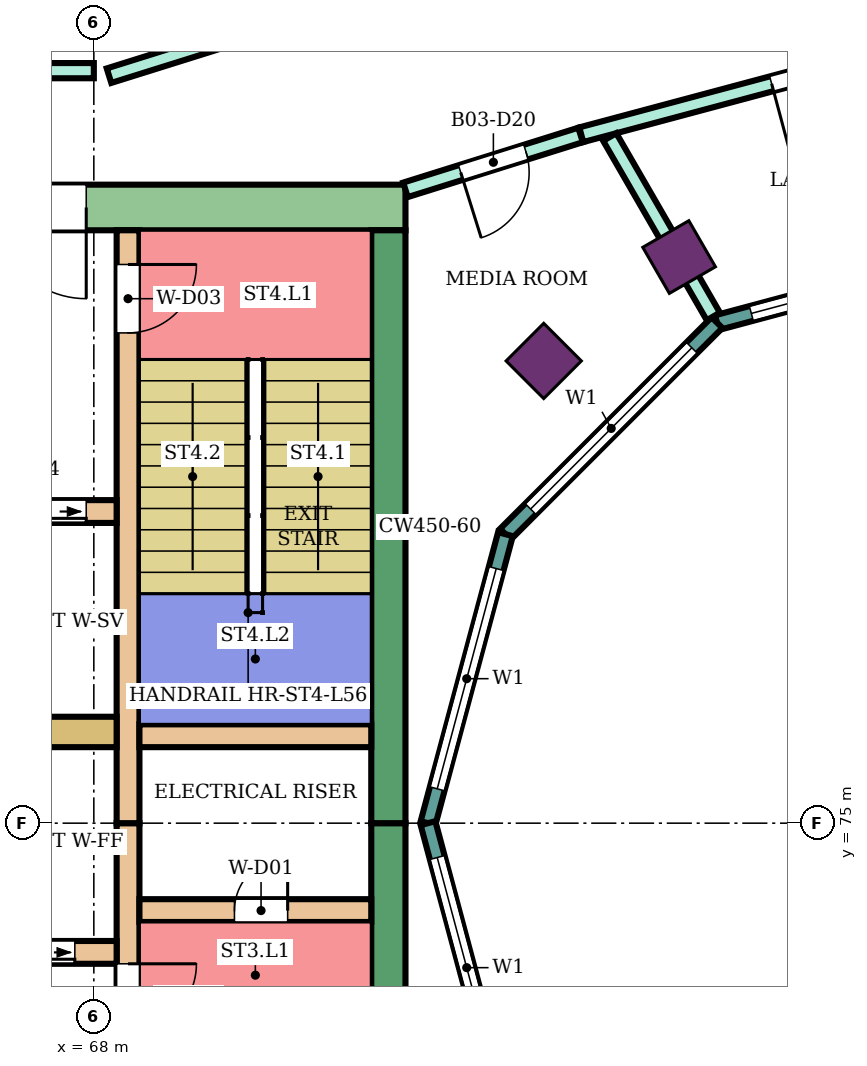
"""IFC4 building model, lengths in metres.
Left out: names, types, materials, properties, quantities, classifications, styles, units other than length and angle.
Written with IfcOpenShell. Run it as: python <this file> out.ifc"""

import sys

from ifc_helpers import new_model, si_unit, direction, frame, frame_2d, origin, origin_2d, place, context, subcontext, project, spatial, rectangle, extrude, element, fill, save


model = new_model("IFC4")
c1 = context("Model", 3, precision=1e-05, world=origin(), true_north=direction((0.0, 1.0)))
c2 = subcontext(c1, "Body", "Model", "MODEL_VIEW")
j1 = project(units=[si_unit("LENGTHUNIT", "METRE"), si_unit("PLANEANGLEUNIT", "RADIAN")], contexts=[c1])
p1 = place(None, origin())
s1 = spatial("IfcSite", under=j1, at=p1, CompositionType="ELEMENT")
p2 = place(p1, origin())
s2 = spatial("IfcBuilding", under=s1, at=p2, CompositionType="ELEMENT")
p3 = place(p2, frame((0.0, 0.0, 245.7)))
s3 = spatial("IfcBuildingStorey", under=s2, at=p3, CompositionType="ELEMENT", Elevation=245.7)
for number, where, z_axis, x_axis in (
    (1, (75.7, 82.448, 0.0), (0.0, 0.0, 1.0), (-0.5, 0.866, 0.0)),
    (2, (73.919, 81.081, 0.0), (0.0, 0.0, 1.0), (-0.707, 0.707, 0.0)),
):
    element("IfcColumn", number, at=place(p3, frame(where, z_axis=z_axis, x_axis=x_axis)), inside=s3, PredefinedType="COLUMN", context=c2, shape_type="SweptSolid", body=[
        extrude(rectangle(XDim=0.7, YDim=0.7, at=origin_2d()), origin(), (0.0, 0.0, 1.0), 4.2),
    ])
p4 = place(p3, frame((72.1, 83.1, 0.0), z_axis=(0.0, 0.0, 1.0), x_axis=(-1.0, 0.0, 0.0)))
e3 = element("IfcWall", 3, at=p4, inside=s3, PredefinedType="SHEAR", context=c2, shape_type="SweptSolid", body=[
    extrude(rectangle(XDim=14.9, YDim=0.6, at=frame_2d((7.45, 0.0))), origin(), (0.0, 0.0, 1.0), 3.88),
])
p5 = place(p4, frame((4.2, 0.0, 0.0)))
e4 = element("IfcOpeningElement", 4, at=p5, cuts=e3, PredefinedType="OPENING", context=c2, shape_type="SweptSolid", body=[
    extrude(rectangle(XDim=2.4, YDim=2.4, at=frame_2d((1.2, 1.2))), frame((0.0, 0.31, 0.0), z_axis=(0.0, -1.0, 0.0), x_axis=(1.0, 0.0, 0.0)), (0.0, 0.0, 1.0), 0.62),
])
for number, where, z_axis, x_axis in (
    (5, (71.875, 75.0, 0.0), (0.0, 0.0, 1.0), (0.0, -1.0, 0.0)),
    (6, (71.875, 82.8, 0.0), (0.0, 0.0, 1.0), (0.0, -1.0, 0.0)),
):
    element("IfcWall", number, at=place(p3, frame(where, z_axis=z_axis, x_axis=x_axis)), inside=s3, PredefinedType="SHEAR", context=c2, shape_type="SweptSolid", body=[
        extrude(rectangle(XDim=7.8, YDim=0.45, at=frame_2d((3.9, 0.0))), origin(), (0.0, 0.0, 1.0), 3.88),
    ])
p6 = place(p3, frame((68.45, 75.0, 0.0), z_axis=(0.0, 0.0, 1.0), x_axis=(0.0, -1.0, 0.0)))
e7 = element("IfcWall", 7, at=p6, inside=s3, PredefinedType="SHEAR", context=c2, shape_type="SweptSolid", body=[
    extrude(rectangle(XDim=7.8, YDim=0.3, at=frame_2d((3.9, 0.0))), origin(), (0.0, 0.0, 1.0), 3.88),
])
p7 = place(p6, frame((1.85, 0.0, 0.0)))
e8 = element("IfcOpeningElement", 8, at=p7, cuts=e7, PredefinedType="OPENING", context=c2, shape_type="SweptSolid", body=[
    extrude(rectangle(XDim=0.9, YDim=2.1, at=frame_2d((0.45, 1.05))), frame((0.0, 0.16, 0.0), z_axis=(0.0, -1.0, 0.0), x_axis=(1.0, 0.0, 0.0)), (0.0, 0.0, 1.0), 0.32),
])
p8 = place(p3, frame((68.45, 82.8, 0.0), z_axis=(0.0, 0.0, 1.0), x_axis=(0.0, -1.0, 0.0)))
e9 = element("IfcWall", 9, at=p8, inside=s3, PredefinedType="SHEAR", context=c2, shape_type="SweptSolid", body=[
    extrude(rectangle(XDim=7.8, YDim=0.3, at=frame_2d((3.9, 0.0))), origin(), (0.0, 0.0, 1.0), 3.88),
])
p9 = place(p8, frame((0.45, 0.0, 0.0)))
e10 = element("IfcOpeningElement", 10, at=p9, cuts=e9, PredefinedType="OPENING", context=c2, shape_type="SweptSolid", body=[
    extrude(rectangle(XDim=0.9, YDim=2.1, at=frame_2d((0.45, 1.05))), frame((0.0, 0.16, 0.0), z_axis=(0.0, -1.0, 0.0), x_axis=(1.0, 0.0, 0.0)), (0.0, 0.0, 1.0), 0.32),
])
p10 = place(p3, frame((71.65, 73.85, 0.0), z_axis=(0.0, 0.0, 1.0), x_axis=(-1.0, 0.0, 0.0)))
e11 = element("IfcWall", 11, at=p10, inside=s3, PredefinedType="SHEAR", context=c2, shape_type="SweptSolid", body=[
    extrude(rectangle(XDim=3.05, YDim=0.3, at=frame_2d((1.525, 0.0))), origin(), (0.0, 0.0, 1.0), 3.88),
])
p11 = place(p10, frame((1.1, 0.0, 0.0)))
e12 = element("IfcOpeningElement", 12, at=p11, cuts=e11, PredefinedType="OPENING", context=c2, shape_type="SweptSolid", body=[
    extrude(rectangle(XDim=0.7, YDim=2.0, at=frame_2d((0.35, 1.0))), frame((0.0, 0.16, 0.0), z_axis=(0.0, -1.0, 0.0), x_axis=(1.0, 0.0, 0.0)), (0.0, 0.0, 1.0), 0.32),
])
p12 = place(p3, frame((71.65, 76.15, 0.0), z_axis=(0.0, 0.0, 1.0), x_axis=(-1.0, 0.0, 0.0)))
e13 = element("IfcWall", 13, at=p12, inside=s3, PredefinedType="SHEAR", context=c2, shape_type="SweptSolid", body=[
    extrude(rectangle(XDim=3.05, YDim=0.3, at=frame_2d((1.525, 0.0))), origin(), (0.0, 0.0, 1.0), 3.88),
])
p13 = place(p3, frame((68.3, 73.3, 0.0), z_axis=(0.0, 0.0, 1.0), x_axis=(-1.0, 0.0, 0.0)))
e14 = element("IfcWall", 14, at=p13, inside=s3, PredefinedType="SHEAR", context=c2, shape_type="SweptSolid", body=[
    extrude(rectangle(XDim=11.1, YDim=0.3, at=frame_2d((5.55, 0.0))), origin(), (0.0, 0.0, 1.0), 3.88),
])
p14 = place(p13, frame((0.55, 0.0, 0.0)))
e15 = element("IfcOpeningElement", 15, at=p14, cuts=e14, PredefinedType="OPENING", context=c2, shape_type="SweptSolid", body=[
    extrude(rectangle(XDim=1.1, YDim=2.1, at=frame_2d((0.55, 1.05))), frame((0.0, 0.16, 0.0), z_axis=(0.0, -1.0, 0.0), x_axis=(1.0, 0.0, 0.0)), (0.0, 0.0, 1.0), 0.32),
])
p15 = place(p13, frame((3.0, 0.0, 0.0)))
e16 = element("IfcOpeningElement", 16, at=p15, cuts=e14, PredefinedType="OPENING", context=c2, shape_type="SweptSolid", body=[
    extrude(rectangle(XDim=1.2, YDim=2.1, at=frame_2d((0.6, 1.05))), frame((0.0, 0.16, 0.0), z_axis=(0.0, -1.0, 0.0), x_axis=(1.0, 0.0, 0.0)), (0.0, 0.0, 1.0), 0.32),
])
p16 = place(p13, frame((5.5, 0.0, 0.0)))
e17 = element("IfcOpeningElement", 17, at=p16, cuts=e14, PredefinedType="OPENING", context=c2, shape_type="SweptSolid", body=[
    extrude(rectangle(XDim=1.2, YDim=2.1, at=frame_2d((0.6, 1.05))), frame((0.0, 0.16, 0.0), z_axis=(0.0, -1.0, 0.0), x_axis=(1.0, 0.0, 0.0)), (0.0, 0.0, 1.0), 0.32),
])
p17 = place(p13, frame((7.95, 0.0, 0.0)))
e18 = element("IfcOpeningElement", 18, at=p17, cuts=e14, PredefinedType="OPENING", context=c2, shape_type="SweptSolid", body=[
    extrude(rectangle(XDim=0.9, YDim=2.1, at=frame_2d((0.45, 1.05))), frame((0.0, 0.16, 0.0), z_axis=(0.0, -1.0, 0.0), x_axis=(1.0, 0.0, 0.0)), (0.0, 0.0, 1.0), 0.32),
])
p18 = place(p13, frame((9.75, 0.0, 0.0)))
e19 = element("IfcOpeningElement", 19, at=p18, cuts=e14, PredefinedType="OPENING", context=c2, shape_type="SweptSolid", body=[
    extrude(rectangle(XDim=0.9, YDim=2.1, at=frame_2d((0.45, 1.05))), frame((0.0, 0.16, 0.0), z_axis=(0.0, -1.0, 0.0), x_axis=(1.0, 0.0, 0.0)), (0.0, 0.0, 1.0), 0.32),
])
p19 = place(p3, frame((68.3, 76.2, 0.0), z_axis=(0.0, 0.0, 1.0), x_axis=(-1.0, 0.0, 0.0)))
e20 = element("IfcWall", 20, at=p19, inside=s3, PredefinedType="SHEAR", context=c2, shape_type="SweptSolid", body=[
    extrude(rectangle(XDim=11.1, YDim=0.4, at=frame_2d((5.55, 0.0))), origin(), (0.0, 0.0, 1.0), 3.88),
])
p20 = place(p3, frame((68.3, 79.1, 0.0), z_axis=(0.0, 0.0, 1.0), x_axis=(-1.0, 0.0, 0.0)))
e21 = element("IfcWall", 21, at=p20, inside=s3, PredefinedType="SHEAR", context=c2, shape_type="SweptSolid", body=[
    extrude(rectangle(XDim=11.1, YDim=0.3, at=frame_2d((5.55, 0.0))), origin(), (0.0, 0.0, 1.0), 3.88),
])
p21 = place(p20, frame((0.4, 0.0, 0.0)))
e22 = element("IfcOpeningElement", 22, at=p21, cuts=e21, PredefinedType="OPENING", context=c2, shape_type="SweptSolid", body=[
    extrude(rectangle(XDim=1.4, YDim=2.1, at=frame_2d((0.7, 1.05))), frame((0.0, 0.16, 0.0), z_axis=(0.0, -1.0, 0.0), x_axis=(1.0, 0.0, 0.0)), (0.0, 0.0, 1.0), 0.32),
])
p22 = place(p20, frame((3.0, 0.0, 0.0)))
e23 = element("IfcOpeningElement", 23, at=p22, cuts=e21, PredefinedType="OPENING", context=c2, shape_type="SweptSolid", body=[
    extrude(rectangle(XDim=1.2, YDim=2.1, at=frame_2d((0.6, 1.05))), frame((0.0, 0.16, 0.0), z_axis=(0.0, -1.0, 0.0), x_axis=(1.0, 0.0, 0.0)), (0.0, 0.0, 1.0), 0.32),
])
p23 = place(p20, frame((6.075, 0.0, 0.0)))
e24 = element("IfcOpeningElement", 24, at=p23, cuts=e21, PredefinedType="OPENING", context=c2, shape_type="SweptSolid", body=[
    extrude(rectangle(XDim=0.9, YDim=2.1, at=frame_2d((0.45, 1.05))), frame((0.0, 0.16, 0.0), z_axis=(0.0, -1.0, 0.0), x_axis=(1.0, 0.0, 0.0)), (0.0, 0.0, 1.0), 0.32),
])
p24 = place(p20, frame((9.125, 0.0, 0.0)))
e25 = element("IfcOpeningElement", 25, at=p24, cuts=e21, PredefinedType="OPENING", context=c2, shape_type="SweptSolid", body=[
    extrude(rectangle(XDim=0.9, YDim=2.1, at=frame_2d((0.45, 1.05))), frame((0.0, 0.16, 0.0), z_axis=(0.0, -1.0, 0.0), x_axis=(1.0, 0.0, 0.0)), (0.0, 0.0, 1.0), 0.32),
])
p25 = place(p3, frame((80.0, 82.604, 0.0), z_axis=(0.0, 0.0, 1.0), x_axis=(-0.965933654434, -0.258789828301, 0.0)))
e26 = element("IfcWall", 26, at=p25, inside=s3, PredefinedType="NOTDEFINED", context=c2, shape_type="SweptSolid", body=[
    extrude(rectangle(XDim=3.936, YDim=0.2, at=frame_2d((1.968, 0.0))), origin(), (0.0, 0.0, 1.0), 4.2),
])
p26 = place(p25, frame((0.468, 0.0, 0.9)))
e27 = element("IfcOpeningElement", 27, at=p26, cuts=e26, PredefinedType="OPENING", context=c2, shape_type="SweptSolid", body=[
    extrude(rectangle(XDim=3.0, YDim=2.3, at=frame_2d((1.5, 1.15))), frame((0.0, 0.11, 0.0), z_axis=(0.0, -1.0, 0.0), x_axis=(1.0, 0.0, 0.0)), (0.0, 0.0, 1.0), 0.22),
])
p27 = place(p3, frame((76.198, 81.585, 0.0), z_axis=(0.0, 0.0, 1.0), x_axis=(-0.707106781187, -0.707106781187, 0.0)))
e28 = element("IfcWall", 28, at=p27, inside=s3, PredefinedType="NOTDEFINED", context=c2, shape_type="SweptSolid", body=[
    extrude(rectangle(XDim=3.936, YDim=0.2, at=frame_2d((1.968, 0.0))), origin(), (0.0, 0.0, 1.0), 4.2),
])
p28 = place(p27, frame((0.468, 0.0, 0.9)))
e29 = element("IfcOpeningElement", 29, at=p28, cuts=e28, PredefinedType="OPENING", context=c2, shape_type="SweptSolid", body=[
    extrude(rectangle(XDim=3.0, YDim=2.3, at=frame_2d((1.5, 1.15))), frame((0.0, 0.11, 0.0), z_axis=(0.0, -1.0, 0.0), x_axis=(1.0, 0.0, 0.0)), (0.0, 0.0, 1.0), 0.22),
])
p29 = place(p3, frame((73.415, 78.802, 0.0), z_axis=(0.0, 0.0, 1.0), x_axis=(-0.258789828301, -0.965933654434, 0.0)))
e30 = element("IfcWall", 30, at=p29, inside=s3, PredefinedType="NOTDEFINED", context=c2, shape_type="SweptSolid", body=[
    extrude(rectangle(XDim=3.936, YDim=0.2, at=frame_2d((1.968, 0.0))), origin(), (0.0, 0.0, 1.0), 4.2),
])
p30 = place(p29, frame((0.468, 0.0, 0.9)))
e31 = element("IfcOpeningElement", 31, at=p30, cuts=e30, PredefinedType="OPENING", context=c2, shape_type="SweptSolid", body=[
    extrude(rectangle(XDim=3.0, YDim=2.3, at=frame_2d((1.5, 1.15))), frame((0.0, 0.11, 0.0), z_axis=(0.0, -1.0, 0.0), x_axis=(1.0, 0.0, 0.0)), (0.0, 0.0, 1.0), 0.22),
])
p31 = place(p3, frame((72.396, 75.0, 0.0), z_axis=(0.0, 0.0, 1.0), x_axis=(0.258789828301, -0.965933654434, 0.0)))
e32 = element("IfcWall", 32, at=p31, inside=s3, PredefinedType="NOTDEFINED", context=c2, shape_type="SweptSolid", body=[
    extrude(rectangle(XDim=3.936, YDim=0.2, at=frame_2d((1.968, 0.0))), origin(), (0.0, 0.0, 1.0), 4.2),
])
p32 = place(p31, frame((0.468, 0.0, 0.9)))
e33 = element("IfcOpeningElement", 33, at=p32, cuts=e32, PredefinedType="OPENING", context=c2, shape_type="SweptSolid", body=[
    extrude(rectangle(XDim=3.0, YDim=2.3, at=frame_2d((1.5, 1.15))), frame((0.0, 0.11, 0.0), z_axis=(0.0, -1.0, 0.0), x_axis=(1.0, 0.0, 0.0)), (0.0, 0.0, 1.0), 0.22),
])
p33 = place(p3, frame((65.2, 84.9, 0.0), z_axis=(0.0, 0.0, 1.0), x_axis=(1.0, 0.0, 0.0)))
e34 = element("IfcWall", 34, at=p33, inside=s3, PredefinedType="PARTITIONING", context=c2, shape_type="SweptSolid", body=[
    extrude(rectangle(XDim=2.8, YDim=0.2, at=frame_2d((1.4, 0.0))), origin(), (0.0, 0.0, 1.0), 3.75),
])
p34 = place(p3, frame((68.2, 84.834, 0.0), z_axis=(0.0, 0.0, 1.0), x_axis=(0.954272398161, 0.298938438661, 0.0)))
e35 = element("IfcWall", 35, at=p34, inside=s3, PredefinedType="PARTITIONING", context=c2, shape_type="SweptSolid", body=[
    extrude(rectangle(XDim=5.74, YDim=0.2, at=frame_2d((2.87, 0.0))), origin(), (0.0, 0.0, 1.0), 3.75),
])
p35 = place(p3, frame((72.1, 83.332, 0.0), z_axis=(0.0, 0.0, 1.0), x_axis=(0.954233106619, 0.299063836383, 0.0)))
e36 = element("IfcWall", 36, at=p35, inside=s3, PredefinedType="PARTITIONING", context=c2, shape_type="SweptSolid", body=[
    extrude(rectangle(XDim=2.414, YDim=0.2, at=frame_2d((1.207, 0.0))), origin(), (0.0, 0.0, 1.0), 3.75),
])
p36 = place(p35, frame((0.762, 0.0, 0.0)))
e37 = element("IfcOpeningElement", 37, at=p36, cuts=e36, PredefinedType="OPENING", context=c2, shape_type="SweptSolid", body=[
    extrude(rectangle(XDim=0.9, YDim=2.1, at=frame_2d((0.45, 1.05))), frame((0.0, 0.11, 0.0), z_axis=(0.0, -1.0, 0.0), x_axis=(1.0, 0.0, 0.0)), (0.0, 0.0, 1.0), 0.22),
])
p37 = place(p3, frame((74.413, 84.057, 0.0), z_axis=(0.0, 0.0, 1.0), x_axis=(0.965972135939, 0.258646153246, 0.0)))
e38 = element("IfcWall", 38, at=p37, inside=s3, PredefinedType="PARTITIONING", context=c2, shape_type="SweptSolid", body=[
    extrude(rectangle(XDim=5.654, YDim=0.2, at=frame_2d((2.827, 0.0))), origin(), (0.0, 0.0, 1.0), 3.75),
])
p38 = place(p37, frame((2.593, 0.0, 0.0)))
e39 = element("IfcOpeningElement", 39, at=p38, cuts=e38, PredefinedType="OPENING", context=c2, shape_type="SweptSolid", body=[
    extrude(rectangle(XDim=0.9, YDim=2.1, at=frame_2d((0.45, 1.05))), frame((0.0, 0.11, 0.0), z_axis=(0.0, -1.0, 0.0), x_axis=(1.0, 0.0, 0.0)), (0.0, 0.0, 1.0), 0.22),
])
p39 = place(p3, frame((74.787, 84.027, 0.0), z_axis=(0.0, 0.0, 1.0), x_axis=(0.500079107518, -0.86597972622, 0.0)))
e40 = element("IfcWall", 40, at=p39, inside=s3, PredefinedType="PARTITIONING", context=c2, shape_type="SweptSolid", body=[
    extrude(rectangle(XDim=2.726, YDim=0.2, at=frame_2d((1.363, 0.0))), origin(), (0.0, 0.0, 1.0), 3.75),
])
p40 = place(p26, origin())
e41 = element("IfcWindow", 41, at=p40, inside=s3, PartitioningType="SINGLE_PANEL", PredefinedType="WINDOW", context=c2, shape_type="SweptSolid", body=[
    extrude(rectangle(XDim=3.0, YDim=2.3, at=frame_2d((1.5, 1.15))), frame((0.0, 0.03, 0.0), z_axis=(0.0, -1.0, 0.0), x_axis=(1.0, 0.0, 0.0)), (0.0, 0.0, 1.0), 0.06),
])
fill(e27, e41)
p41 = place(p28, origin())
e42 = element("IfcWindow", 42, at=p41, inside=s3, PartitioningType="SINGLE_PANEL", PredefinedType="WINDOW", context=c2, shape_type="SweptSolid", body=[
    extrude(rectangle(XDim=3.0, YDim=2.3, at=frame_2d((1.5, 1.15))), frame((0.0, 0.03, 0.0), z_axis=(0.0, -1.0, 0.0), x_axis=(1.0, 0.0, 0.0)), (0.0, 0.0, 1.0), 0.06),
])
fill(e29, e42)
p42 = place(p30, origin())
e43 = element("IfcWindow", 43, at=p42, inside=s3, PartitioningType="SINGLE_PANEL", PredefinedType="WINDOW", context=c2, shape_type="SweptSolid", body=[
    extrude(rectangle(XDim=3.0, YDim=2.3, at=frame_2d((1.5, 1.15))), frame((0.0, 0.03, 0.0), z_axis=(0.0, -1.0, 0.0), x_axis=(1.0, 0.0, 0.0)), (0.0, 0.0, 1.0), 0.06),
])
fill(e31, e43)
p43 = place(p32, origin())
e44 = element("IfcWindow", 44, at=p43, inside=s3, PartitioningType="SINGLE_PANEL", PredefinedType="WINDOW", context=c2, shape_type="SweptSolid", body=[
    extrude(rectangle(XDim=3.0, YDim=2.3, at=frame_2d((1.5, 1.15))), frame((0.0, 0.03, 0.0), z_axis=(0.0, -1.0, 0.0), x_axis=(1.0, 0.0, 0.0)), (0.0, 0.0, 1.0), 0.06),
])
fill(e33, e44)
p44 = place(p38, frame((0.9, 0.0, 0.0), z_axis=(0.0, 0.0, 1.0), x_axis=(-1.0, 0.0, 0.0)))
e45 = element("IfcDoor", 45, at=p44, inside=s3, OperationType="SINGLE_SWING_RIGHT", PredefinedType="DOOR", context=c2, shape_type="SweptSolid", body=[
    extrude(rectangle(XDim=0.9, YDim=2.1, at=frame_2d((0.45, 1.05))), frame((0.0, 0.025, 0.0), z_axis=(0.0, -1.0, 0.0), x_axis=(1.0, 0.0, 0.0)), (0.0, 0.0, 1.0), 0.05),
])
fill(e39, e45)
p45 = place(p36, frame((0.9, 0.0, 0.0), z_axis=(0.0, 0.0, 1.0), x_axis=(-1.0, 0.0, 0.0)))
e46 = element("IfcDoor", 46, at=p45, inside=s3, OperationType="SINGLE_SWING_RIGHT", PredefinedType="DOOR", context=c2, shape_type="SweptSolid", body=[
    extrude(rectangle(XDim=0.9, YDim=2.1, at=frame_2d((0.45, 1.05))), frame((0.0, 0.025, 0.0), z_axis=(0.0, -1.0, 0.0), x_axis=(1.0, 0.0, 0.0)), (0.0, 0.0, 1.0), 0.05),
])
fill(e37, e46)
p46 = place(p11, frame((0.7, 0.0, 0.0), z_axis=(0.0, 0.0, 1.0), x_axis=(-1.0, 0.0, 0.0)))
e47 = element("IfcDoor", 47, at=p46, inside=s3, OperationType="SINGLE_SWING_RIGHT", PredefinedType="DOOR", context=c2, shape_type="SweptSolid", body=[
    extrude(rectangle(XDim=0.7, YDim=2.0, at=frame_2d((0.35, 1.0))), frame((0.0, 0.025, 0.0), z_axis=(0.0, -1.0, 0.0), x_axis=(1.0, 0.0, 0.0)), (0.0, 0.0, 1.0), 0.05),
])
fill(e12, e47)
p47 = place(p7, origin())
e48 = element("IfcDoor", 48, at=p47, inside=s3, OperationType="SINGLE_SWING_LEFT", PredefinedType="DOOR", context=c2, shape_type="SweptSolid", body=[
    extrude(rectangle(XDim=0.9, YDim=2.1, at=frame_2d((0.45, 1.05))), frame((0.0, 0.025, 0.0), z_axis=(0.0, -1.0, 0.0), x_axis=(1.0, 0.0, 0.0)), (0.0, 0.0, 1.0), 0.05),
])
fill(e8, e48)
p48 = place(p9, origin())
e49 = element("IfcDoor", 49, at=p48, inside=s3, OperationType="SINGLE_SWING_LEFT", PredefinedType="DOOR", context=c2, shape_type="SweptSolid", body=[
    extrude(rectangle(XDim=0.9, YDim=2.1, at=frame_2d((0.45, 1.05))), frame((0.0, 0.025, 0.0), z_axis=(0.0, -1.0, 0.0), x_axis=(1.0, 0.0, 0.0)), (0.0, 0.0, 1.0), 0.05),
])
fill(e10, e49)
p49 = place(p14, origin())
e50 = element("IfcDoor", 50, at=p49, inside=s3, OperationType="DOUBLE_DOOR_SLIDING", PredefinedType="DOOR", context=c2, shape_type="SweptSolid", body=[
    extrude(rectangle(XDim=1.1, YDim=2.1, at=frame_2d((0.55, 1.05))), frame((0.0, 0.025, 0.0), z_axis=(0.0, -1.0, 0.0), x_axis=(1.0, 0.0, 0.0)), (0.0, 0.0, 1.0), 0.05),
])
fill(e15, e50)
p50 = place(p21, origin())
e51 = element("IfcDoor", 51, at=p50, inside=s3, OperationType="DOUBLE_DOOR_SLIDING", PredefinedType="DOOR", context=c2, shape_type="SweptSolid", body=[
    extrude(rectangle(XDim=1.4, YDim=2.1, at=frame_2d((0.7, 1.05))), frame((0.0, 0.025, 0.0), z_axis=(0.0, -1.0, 0.0), x_axis=(1.0, 0.0, 0.0)), (0.0, 0.0, 1.0), 0.05),
])
fill(e22, e51)
p51 = place(p5, origin())
e52 = element("IfcDoor", 52, at=p51, inside=s3, OperationType="DOUBLE_DOOR_SINGLE_SWING", PredefinedType="DOOR", context=c2, shape_type="SweptSolid", body=[
    extrude(rectangle(XDim=2.4, YDim=2.4, at=frame_2d((1.2, 1.2))), frame((0.0, 0.025, 0.0), z_axis=(0.0, -1.0, 0.0), x_axis=(1.0, 0.0, 0.0)), (0.0, 0.0, 1.0), 0.05),
])
fill(e4, e52)
save(model, sys.argv[1])
